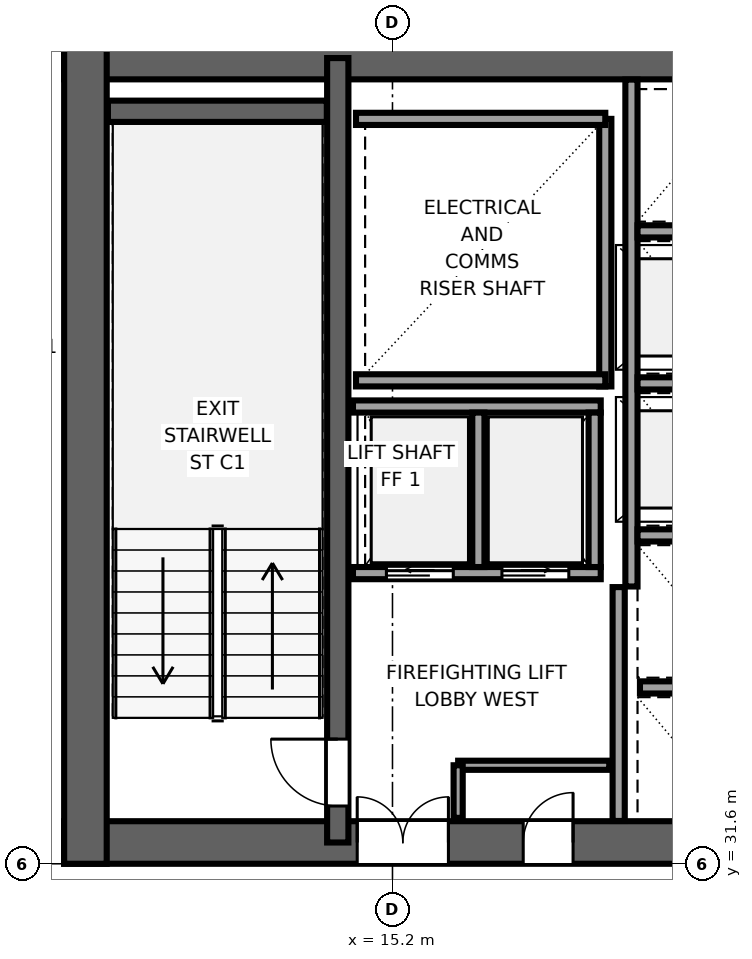
"""IFC4 building model, lengths in metres.
Left out: names, types, materials, properties, quantities, classifications, styles, units other than length and angle.
Written with IfcOpenShell. Run it as: python <this file> out.ifc"""

import sys

from ifc_helpers import new_model, si_unit, direction, frame, frame_2d, origin, place, context, subcontext, project, spatial, rectangle, extrude, source, transform, mapped, element, fill, save


model = new_model("IFC4")
c1 = context("Model", 3, precision=1e-05, world=origin(), true_north=direction((0.0, 1.0)))
c2 = subcontext(c1, "Body", "Model", "MODEL_VIEW")
j1 = project(units=[si_unit("LENGTHUNIT", "METRE"), si_unit("PLANEANGLEUNIT", "RADIAN")], contexts=[c1])
p1 = place(None, origin())
s1 = spatial("IfcSite", under=j1, at=p1, CompositionType="ELEMENT")
p2 = place(p1, origin())
s2 = spatial("IfcBuilding", under=s1, at=p2, CompositionType="ELEMENT")
p3 = place(p2, frame((0.0, 0.0, 187.55)))
s3 = spatial("IfcBuildingStorey", under=s2, at=p3, CompositionType="ELEMENT", Elevation=187.55)
p4 = place(p3, frame((9.8, 31.95, 0.0), z_axis=(0.0, 0.0, 1.0), x_axis=(1.0, 0.0, 0.0)))
e1 = element("IfcWall", 1, at=p4, inside=s3, PredefinedType="SHEAR", context=c2, shape_type="SweptSolid", body=[
    extrude(rectangle(XDim=26.4, YDim=0.7, at=frame_2d((13.2, 0.0))), origin(), (0.0, 0.0, 1.0), 3.55),
])
p5 = place(p4, frame((6.32, 0.0, 0.0), z_axis=(0.0, 0.0, 1.0), x_axis=(-1.0, 0.0, 0.0)))
e2 = element("IfcOpeningElement", 2, at=p5, cuts=e1, PredefinedType="OPENING", context=c2, shape_type="SweptSolid", body=[
    extrude(rectangle(XDim=1.5, YDim=2.04, at=frame_2d((0.75, 1.02))), frame((0.0, 0.36, 0.0), z_axis=(0.0, -1.0, 0.0), x_axis=(1.0, 0.0, 0.0)), (0.0, 0.0, 1.0), 0.72),
])
p6 = place(p4, frame((13.95, 0.0, 0.0), z_axis=(0.0, 0.0, 1.0), x_axis=(-1.0, 0.0, 0.0)))
e3 = element("IfcOpeningElement", 3, at=p6, cuts=e1, PredefinedType="OPENING", context=c2, shape_type="SweptSolid", body=[
    extrude(rectangle(XDim=1.5, YDim=2.04, at=frame_2d((0.75, 1.02))), frame((0.0, 0.36, 0.0), z_axis=(0.0, -1.0, 0.0), x_axis=(1.0, 0.0, 0.0)), (0.0, 0.0, 1.0), 0.72),
])
p7 = place(p4, frame((20.25, 0.0, 0.0), z_axis=(0.0, 0.0, 1.0), x_axis=(-1.0, 0.0, 0.0)))
e4 = element("IfcOpeningElement", 4, at=p7, cuts=e1, PredefinedType="OPENING", context=c2, shape_type="SweptSolid", body=[
    extrude(rectangle(XDim=1.5, YDim=2.04, at=frame_2d((0.75, 1.02))), frame((0.0, 0.36, 0.0), z_axis=(0.0, -1.0, 0.0), x_axis=(1.0, 0.0, 0.0)), (0.0, 0.0, 1.0), 0.72),
])
p8 = place(p4, frame((8.37, 0.0, 0.0), z_axis=(0.0, 0.0, 1.0), x_axis=(-1.0, 0.0, 0.0)))
e5 = element("IfcOpeningElement", 5, at=p8, cuts=e1, PredefinedType="OPENING", context=c2, shape_type="SweptSolid", body=[
    extrude(rectangle(XDim=0.82, YDim=2.01, at=frame_2d((0.41, 1.005))), frame((0.0, 0.36, 0.0), z_axis=(0.0, -1.0, 0.0), x_axis=(1.0, 0.0, 0.0)), (0.0, 0.0, 1.0), 0.72),
])
p9 = place(p3, frame((9.8, 44.85, 0.0), z_axis=(0.0, 0.0, 1.0), x_axis=(1.0, 0.0, 0.0)))
e6 = element("IfcWall", 6, at=p9, inside=s3, PredefinedType="SHEAR", context=c2, shape_type="SweptSolid", body=[
    extrude(rectangle(XDim=26.4, YDim=0.7, at=frame_2d((13.2, 0.0))), origin(), (0.0, 0.0, 1.0), 3.55),
])
p10 = place(p3, frame((10.15, 31.6, 0.0), z_axis=(0.0, 0.0, 1.0), x_axis=(0.0, 1.0, 0.0)))
e7 = element("IfcWall", 7, at=p10, inside=s3, PredefinedType="SHEAR", context=c2, shape_type="SweptSolid", body=[
    extrude(rectangle(XDim=13.6, YDim=0.7, at=frame_2d((6.8, 0.0))), origin(), (0.0, 0.0, 1.0), 3.55),
])
p11 = place(p3, frame((14.3, 31.95, 0.0), z_axis=(0.0, 0.0, 1.0), x_axis=(0.0, 1.0, 0.0)))
e8 = element("IfcWall", 8, at=p11, inside=s3, PredefinedType="SHEAR", context=c2, shape_type="SweptSolid", body=[
    extrude(rectangle(XDim=12.9, YDim=0.35, at=frame_2d((6.45, 0.0))), origin(), (0.0, 0.0, 1.0), 3.55),
])
p12 = place(p11, frame((0.6, 0.0, 0.0)))
e9 = element("IfcOpeningElement", 9, at=p12, cuts=e8, PredefinedType="OPENING", context=c2, shape_type="SweptSolid", body=[
    extrude(rectangle(XDim=1.1, YDim=2.12, at=frame_2d((0.55, 1.06))), frame((0.0, 0.185, 0.0), z_axis=(0.0, -1.0, 0.0), x_axis=(1.0, 0.0, 0.0)), (0.0, 0.0, 1.0), 0.37),
])
p13 = place(p3, frame((10.52, 43.975, 0.0), z_axis=(0.0, 0.0, 1.0), x_axis=(1.0, 0.0, 0.0)))
e10 = element("IfcWall", 10, at=p13, inside=s3, PredefinedType="SHEAR", context=c2, shape_type="SweptSolid", body=[
    extrude(rectangle(XDim=3.6, YDim=0.35, at=frame_2d((1.8, 0.0))), origin(), (0.0, 0.0, 1.0), 3.55),
])
p14 = place(p3, frame((18.7, 39.45, 0.0), z_axis=(0.0, 0.0, 1.0), x_axis=(0.0, 1.0, 0.0)))
e11 = element("IfcWall", 11, at=p14, inside=s3, PredefinedType="SOLIDWALL", context=c2, shape_type="SweptSolid", body=[
    extrude(rectangle(XDim=4.4, YDim=0.2, at=frame_2d((2.2, 0.0))), origin(), (0.0, 0.0, 1.0), 3.37),
])
for number, where, z_axis, x_axis in (
    (12, (14.6, 39.55, 0.0), (0.0, 0.0, 1.0), (1.0, 0.0, 0.0)),
    (13, (14.6, 43.85, 0.0), (0.0, 0.0, 1.0), (1.0, 0.0, 0.0)),
):
    element("IfcWall", number, at=place(p3, frame(where, z_axis=z_axis, x_axis=x_axis)), inside=s3, PredefinedType="SOLIDWALL", context=c2, shape_type="SweptSolid", body=[
        extrude(rectangle(XDim=4.1, YDim=0.2, at=frame_2d((2.05, 0.0))), origin(), (0.0, 0.0, 1.0), 3.37),
    ])
p15 = place(p3, frame((18.92, 32.304, 0.0), z_axis=(0.0, 0.0, 1.0), x_axis=(0.0, 1.0, 0.0)))
e14 = element("IfcWall", 14, at=p15, inside=s3, PredefinedType="SOLIDWALL", context=c2, shape_type="SweptSolid", body=[
    extrude(rectangle(XDim=3.846, YDim=0.2, at=frame_2d((1.923, 0.0))), origin(), (0.0, 0.0, 1.0), 3.37),
])
p16 = place(p3, frame((19.13, 36.16, 0.0), z_axis=(0.0, 0.0, 1.0), x_axis=(0.0, 1.0, 0.0)))
e15 = element("IfcWall", 15, at=p16, inside=s3, PredefinedType="SOLIDWALL", context=c2, shape_type="SweptSolid", body=[
    extrude(rectangle(XDim=8.336, YDim=0.2, at=frame_2d((4.168, 0.0))), origin(), (0.0, 0.0, 1.0), 3.37),
])
p17 = place(p3, frame((19.27, 34.5, 0.0), z_axis=(0.0, 0.0, 1.0), x_axis=(1.0, 0.0, 0.0)))
e16 = element("IfcWall", 16, at=p17, inside=s3, PredefinedType="SOLIDWALL", context=c2, shape_type="SweptSolid", body=[
    extrude(rectangle(XDim=1.8, YDim=0.2, at=frame_2d((0.9, 0.0))), origin(), (0.0, 0.0, 1.0), 3.37),
])
for number, where, z_axis, x_axis in (
    (17, (19.23, 37.0, 0.0), (0.0, 0.0, 1.0), (1.0, 0.0, 0.0)),
    (18, (19.23, 39.5, 0.0), (0.0, 0.0, 1.0), (1.0, 0.0, 0.0)),
    (19, (19.23, 42.0, 0.0), (0.0, 0.0, 1.0), (1.0, 0.0, 0.0)),
):
    element("IfcWall", number, at=place(p3, frame(where, z_axis=z_axis, x_axis=x_axis)), inside=s3, PredefinedType="SOLIDWALL", context=c2, shape_type="SweptSolid", body=[
        extrude(rectangle(XDim=1.84, YDim=0.2, at=frame_2d((0.92, 0.0))), origin(), (0.0, 0.0, 1.0), 3.37),
    ])
p18 = place(p3, frame((14.55, 36.38, 0.0), z_axis=(0.0, 0.0, 1.0), x_axis=(1.0, 0.0, 0.0)))
e20 = element("IfcWall", 20, at=p18, inside=s3, PredefinedType="SOLIDWALL", context=c2, shape_type="SweptSolid", body=[
    extrude(rectangle(XDim=4.075, YDim=0.2, at=frame_2d((2.038, 0.0))), origin(), (0.0, 0.0, 1.0), 3.37),
])
p19 = place(p18, frame((0.55, 0.0, 0.0)))
e21 = element("IfcOpeningElement", 21, at=p19, cuts=e20, PredefinedType="OPENING", context=c2, shape_type="SweptSolid", body=[
    extrude(rectangle(XDim=1.1, YDim=2.12, at=frame_2d((0.55, 1.06))), frame((0.0, 0.11, 0.0), z_axis=(0.0, -1.0, 0.0), x_axis=(1.0, 0.0, 0.0)), (0.0, 0.0, 1.0), 0.22),
])
p20 = place(p18, frame((2.45, 0.0, 0.0)))
e22 = element("IfcOpeningElement", 22, at=p20, cuts=e20, PredefinedType="OPENING", context=c2, shape_type="SweptSolid", body=[
    extrude(rectangle(XDim=1.1, YDim=2.12, at=frame_2d((0.55, 1.06))), frame((0.0, 0.11, 0.0), z_axis=(0.0, -1.0, 0.0), x_axis=(1.0, 0.0, 0.0)), (0.0, 0.0, 1.0), 0.22),
])
p21 = place(p3, frame((14.55, 39.12, 0.0), z_axis=(0.0, 0.0, 1.0), x_axis=(1.0, 0.0, 0.0)))
e23 = element("IfcWall", 23, at=p21, inside=s3, PredefinedType="SOLIDWALL", context=c2, shape_type="SweptSolid", body=[
    extrude(rectangle(XDim=4.075, YDim=0.2, at=frame_2d((2.038, 0.0))), origin(), (0.0, 0.0, 1.0), 3.37),
])
for number, where, z_axis, x_axis in (
    (24, (18.525, 36.48, 0.0), (0.0, 0.0, 1.0), (0.0, 1.0, 0.0)),
    (25, (16.613, 36.48, 0.0), (0.0, 0.0, 1.0), (0.0, 1.0, 0.0)),
):
    element("IfcWall", number, at=place(p3, frame(where, z_axis=z_axis, x_axis=x_axis)), inside=s3, PredefinedType="SOLIDWALL", context=c2, shape_type="SweptSolid", body=[
        extrude(rectangle(XDim=2.54, YDim=0.2, at=frame_2d((1.27, 0.0))), origin(), (0.0, 0.0, 1.0), 3.37),
    ])
p22 = place(p3, frame((16.28, 33.22, 0.0), z_axis=(0.0, 0.0, 1.0), x_axis=(1.0, 0.0, 0.0)))
e26 = element("IfcWall", 26, at=p22, inside=s3, PredefinedType="PARTITIONING", context=c2, shape_type="SweptSolid", body=[
    extrude(rectangle(XDim=2.485, YDim=0.15, at=frame_2d((1.242, 0.0))), origin(), (0.0, 0.0, 1.0), 3.37),
])
p23 = place(p3, frame((16.28, 32.355, 0.0), z_axis=(0.0, 0.0, 1.0), x_axis=(0.0, 1.0, 0.0)))
e27 = element("IfcWall", 27, at=p23, inside=s3, PredefinedType="PARTITIONING", context=c2, shape_type="SweptSolid", body=[
    extrude(rectangle(XDim=0.865, YDim=0.15, at=frame_2d((0.433, 0.0))), origin(), (0.0, 0.0, 1.0), 3.37),
])
m1 = source(origin(), c2, "Body", "SweptSolid", [
    extrude(rectangle(XDim=1.1, YDim=2.12, at=frame_2d((0.55, 1.06))), frame((0.0, 0.025, 0.0), z_axis=(0.0, -1.0, 0.0), x_axis=(1.0, 0.0, 0.0)), (0.0, 0.0, 1.0), 0.05),
])
p24 = place(p12, origin())
e28 = element("IfcDoor", 28, at=p24, inside=s3, OperationType="SINGLE_SWING_RIGHT", PredefinedType="DOOR", context=c2, shape_type="MappedRepresentation", body=[
    mapped(m1, transform((0.0, 0.0, 0.0), x_axis=(1.0, 0.0, 0.0), y_axis=(0.0, 1.0, 0.0), z_axis=(0.0, 0.0, 1.0), scale=1.0)),
])
fill(e9, e28)
m2 = source(origin(), c2, "Body", "SweptSolid", [
    extrude(rectangle(XDim=1.5, YDim=2.04, at=frame_2d((0.75, 1.02))), frame((0.0, 0.025, 0.0), z_axis=(0.0, -1.0, 0.0), x_axis=(1.0, 0.0, 0.0)), (0.0, 0.0, 1.0), 0.05),
])
p25 = place(p5, origin())
e29 = element("IfcDoor", 29, at=p25, inside=s3, OperationType="DOUBLE_DOOR_SINGLE_SWING", PredefinedType="DOOR", context=c2, shape_type="MappedRepresentation", body=[
    mapped(m2, transform((0.0, 0.0, 0.0), x_axis=(1.0, 0.0, 0.0), y_axis=(0.0, 1.0, 0.0), z_axis=(0.0, 0.0, 1.0), scale=1.0)),
])
fill(e2, e29)
m3 = source(origin(), c2, "Body", "SweptSolid", [
    extrude(rectangle(XDim=0.82, YDim=2.01, at=frame_2d((0.41, 1.005))), frame((0.0, 0.025, 0.0), z_axis=(0.0, -1.0, 0.0), x_axis=(1.0, 0.0, 0.0)), (0.0, 0.0, 1.0), 0.05),
])
p26 = place(p8, origin())
e30 = element("IfcDoor", 30, at=p26, inside=s3, OperationType="SINGLE_SWING_RIGHT", PredefinedType="DOOR", context=c2, shape_type="MappedRepresentation", body=[
    mapped(m3, transform((0.0, 0.0, 0.0), x_axis=(1.0, 0.0, 0.0), y_axis=(0.0, 1.0, 0.0), z_axis=(0.0, 0.0, 1.0), scale=1.0)),
])
fill(e5, e30)
m4 = source(origin(), c2, "Body", "SweptSolid", [
    extrude(rectangle(XDim=1.1, YDim=2.12, at=frame_2d((0.55, 1.06))), frame((0.0, 0.025, 0.0), z_axis=(0.0, -1.0, 0.0), x_axis=(1.0, 0.0, 0.0)), (0.0, 0.0, 1.0), 0.05),
])
p27 = place(p19, origin())
e31 = element("IfcDoor", 31, at=p27, inside=s3, OperationType="SLIDING_TO_LEFT", PredefinedType="DOOR", context=c2, shape_type="MappedRepresentation", body=[
    mapped(m4, transform((0.0, 0.0, 0.0), x_axis=(1.0, 0.0, 0.0), y_axis=(0.0, 1.0, 0.0), z_axis=(0.0, 0.0, 1.0), scale=1.0)),
])
fill(e21, e31)
p28 = place(p20, origin())
e32 = element("IfcDoor", 32, at=p28, inside=s3, OperationType="SLIDING_TO_RIGHT", PredefinedType="DOOR", context=c2, shape_type="MappedRepresentation", body=[
    mapped(m4, transform((0.0, 0.0, 0.0), x_axis=(1.0, 0.0, 0.0), y_axis=(0.0, 1.0, 0.0), z_axis=(0.0, 0.0, 1.0), scale=1.0)),
])
fill(e22, e32)
save(model, sys.argv[1])
